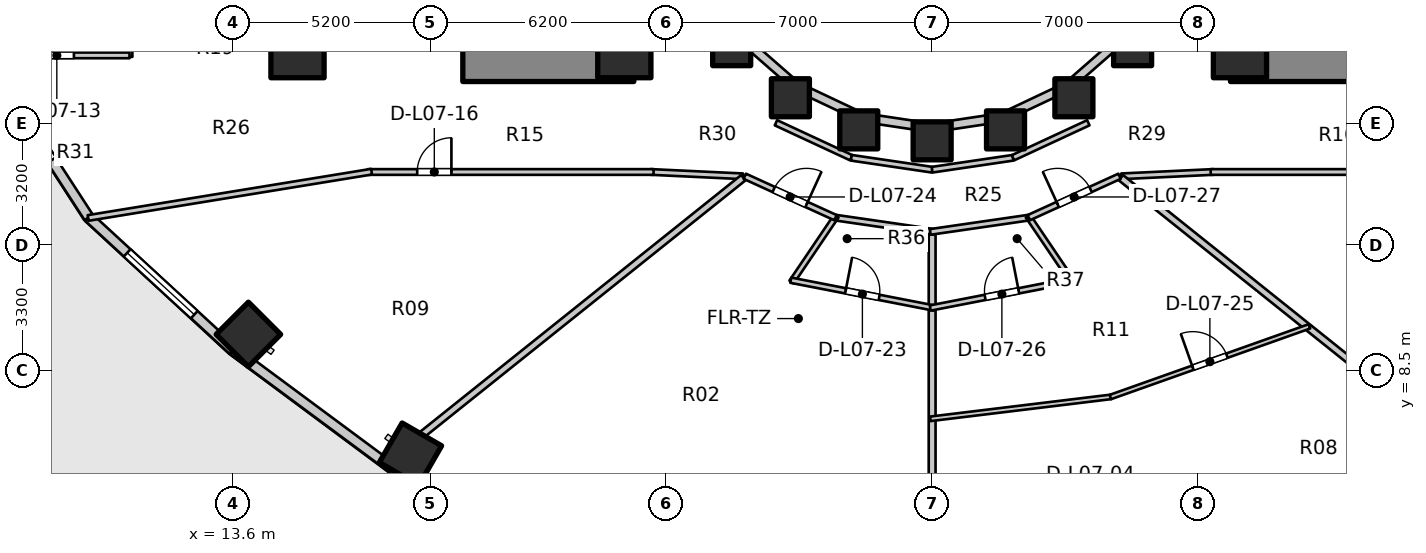
"""IFC4 building model, lengths in metres.
Left out: names, types, materials, properties, quantities, classifications, styles, units other than length and angle.
Written with IfcOpenShell. Run it as: python <this file> out.ifc"""

import sys

from ifc_helpers import new_model, si_unit, direction, frame, frame_2d, origin, origin_2d, place, context, subcontext, project, spatial, rectangle, extrude, element, fill, save


model = new_model("IFC4")
c1 = context("Model", 3, precision=1e-05, world=origin(), true_north=direction((0.0, 1.0)))
c2 = subcontext(c1, "Body", "Model", "MODEL_VIEW")
j1 = project(units=[si_unit("LENGTHUNIT", "METRE"), si_unit("PLANEANGLEUNIT", "RADIAN")], contexts=[c1])
p1 = place(None, origin())
s1 = spatial("IfcSite", under=j1, at=p1, CompositionType="ELEMENT")
p2 = place(p1, origin())
s2 = spatial("IfcBuilding", under=s1, at=p2, CompositionType="ELEMENT")
p3 = place(p2, frame((0.0, 0.0, 27.6)))
s3 = spatial("IfcBuildingStorey", under=s2, at=p3, CompositionType="ELEMENT", Elevation=27.6)
for number, where, z_axis, x_axis in (
    (1, (19.65, 16.55, 0.0), (0.0, 0.0, 1.0), (1.0, 0.0, 0.0)),
    (2, (39.85, 16.55, 0.0), (0.0, 0.0, 1.0), (1.0, 0.0, 0.0)),
):
    element("IfcWall", number, at=place(p3, frame(where, z_axis=z_axis, x_axis=x_axis)), inside=s3, PredefinedType="SHEAR", context=c2, shape_type="SweptSolid", body=[
        extrude(rectangle(XDim=4.5, YDim=0.9, at=frame_2d((2.25, 0.0))), origin(), (0.0, 0.0, 1.0), 3.1),
    ])
for number, where, z_axis, x_axis in (
    (3, (15.3, 16.9, 0.0), (0.0, 0.0, 1.0), (1.0, 0.0, 0.0)),
    (4, (23.9, 16.9, 0.0), (0.0, 0.0, 1.0), (1.0, 0.0, 0.0)),
    (5, (40.1, 16.9, 0.0), (0.0, 0.0, 1.0), (1.0, 0.0, 0.0)),
):
    element("IfcColumn", number, at=place(p3, frame(where, z_axis=z_axis, x_axis=x_axis)), inside=s3, PredefinedType="COLUMN", context=c2, shape_type="SweptSolid", body=[
        extrude(rectangle(XDim=1.4, YDim=1.4, at=origin_2d()), origin(), (0.0, 0.0, 1.0), 3.1),
    ])
p4 = place(p3, frame((26.725, 17.018, 0.0), z_axis=(0.0, 0.0, 1.0), x_axis=(1.0, 0.0, 0.0)))
e6 = element("IfcColumn", 6, at=p4, inside=s3, PredefinedType="COLUMN", context=c2, shape_type="SweptSolid", body=[
    extrude(rectangle(XDim=1.0, YDim=1.0, at=origin_2d()), origin(), (0.0, 0.0, 1.0), 3.1),
])
p5 = place(p3, frame((14.008, 9.446, 0.0), z_axis=(0.0, 0.0, 1.0), x_axis=(-0.707106781187, -0.707106781187, 0.0)))
e7 = element("IfcColumn", 7, at=p5, inside=s3, PredefinedType="COLUMN", context=c2, shape_type="SweptSolid", body=[
    extrude(rectangle(XDim=1.2, YDim=1.2, at=origin_2d()), origin(), (0.0, 0.0, 1.0), 3.1),
])
p6 = place(p3, frame((28.27, 15.673, 0.0), z_axis=(0.0, 0.0, 1.0), x_axis=(1.0, 0.0, 0.0)))
e8 = element("IfcColumn", 8, at=p6, inside=s3, PredefinedType="COLUMN", context=c2, shape_type="SweptSolid", body=[
    extrude(rectangle(XDim=1.0, YDim=1.0, at=origin_2d()), origin(), (0.0, 0.0, 1.0), 3.1),
])
p7 = place(p3, frame((18.273, 6.296, 0.0), z_axis=(0.0, 0.0, 1.0), x_axis=(-0.5, -0.866025403784, 0.0)))
e9 = element("IfcColumn", 9, at=p7, inside=s3, PredefinedType="COLUMN", context=c2, shape_type="SweptSolid", body=[
    extrude(rectangle(XDim=1.2, YDim=1.2, at=origin_2d()), origin(), (0.0, 0.0, 1.0), 3.1),
])
for number, where, z_axis, x_axis in (
    (10, (30.069, 14.828, 0.0), (0.0, 0.0, 1.0), (1.0, 0.0, 0.0)),
    (11, (32.0, 14.54, 0.0), (0.0, 0.0, 1.0), (1.0, 0.0, 0.0)),
    (12, (33.931, 14.828, 0.0), (0.0, 0.0, 1.0), (1.0, 0.0, 0.0)),
    (13, (35.73, 15.673, 0.0), (0.0, 0.0, 1.0), (1.0, 0.0, 0.0)),
    (14, (37.275, 17.018, 0.0), (0.0, 0.0, 1.0), (1.0, 0.0, 0.0)),
):
    element("IfcColumn", number, at=place(p3, frame(where, z_axis=z_axis, x_axis=x_axis)), inside=s3, PredefinedType="COLUMN", context=c2, shape_type="SweptSolid", body=[
        extrude(rectangle(XDim=1.0, YDim=1.0, at=origin_2d()), origin(), (0.0, 0.0, 1.0), 3.1),
    ])
p8 = place(p3, frame((26.965, 17.258, 0.0), z_axis=(0.0, 0.0, 1.0), x_axis=(0.752576694707, -0.658504607869, 0.0)))
e15 = element("IfcWall", 15, at=p8, inside=s3, PredefinedType="STANDARD", context=c2, shape_type="SweptSolid", body=[
    extrude(rectangle(XDim=1.959, YDim=0.23, at=frame_2d((0.98, 0.0))), origin(), (0.0, 0.0, 1.0), 2.16),
])
p9 = place(p3, frame((28.44, 15.968, 0.0), z_axis=(0.0, 0.0, 1.0), x_axis=(0.904179699603, -0.427152280606, 0.0)))
e16 = element("IfcWall", 16, at=p9, inside=s3, PredefinedType="STANDARD", context=c2, shape_type="SweptSolid", body=[
    extrude(rectangle(XDim=1.899, YDim=0.23, at=frame_2d((0.95, 0.0))), origin(), (0.0, 0.0, 1.0), 2.16),
])
for number, where, z_axis, x_axis in (
    (17, (30.157, 15.157, 0.0), (0.0, 0.0, 1.0), (0.989, -0.149, 0.0)),
    (18, (32.0, 14.88, 0.0), (0.0, 0.0, 1.0), (0.989, 0.149, 0.0)),
):
    element("IfcWall", number, at=place(p3, frame(where, z_axis=z_axis, x_axis=x_axis)), inside=s3, PredefinedType="STANDARD", context=c2, shape_type="SweptSolid", body=[
        extrude(rectangle(XDim=1.864, YDim=0.23, at=frame_2d((0.932, 0.0))), origin(), (0.0, 0.0, 1.0), 2.16),
    ])
p10 = place(p3, frame((33.843, 15.157, 0.0), z_axis=(0.0, 0.0, 1.0), x_axis=(0.904179699603, 0.427152280606, 0.0)))
e19 = element("IfcWall", 19, at=p10, inside=s3, PredefinedType="STANDARD", context=c2, shape_type="SweptSolid", body=[
    extrude(rectangle(XDim=1.899, YDim=0.23, at=frame_2d((0.95, 0.0))), origin(), (0.0, 0.0, 1.0), 2.16),
])
p11 = place(p3, frame((35.56, 15.968, 0.0), z_axis=(0.0, 0.0, 1.0), x_axis=(0.752576694707, 0.658504607869, 0.0)))
e20 = element("IfcWall", 20, at=p11, inside=s3, PredefinedType="STANDARD", context=c2, shape_type="SweptSolid", body=[
    extrude(rectangle(XDim=1.959, YDim=0.23, at=frame_2d((0.98, 0.0))), origin(), (0.0, 0.0, 1.0), 2.16),
])
p12 = place(p3, frame((7.033, 16.795, 0.0), z_axis=(0.0, 0.0, 1.0), x_axis=(0.544578722263, -0.838709732421, 0.0)))
e21 = element("IfcWall", 21, at=p12, inside=s3, PredefinedType="STANDARD", context=c2, shape_type="SweptSolid", body=[
    extrude(rectangle(XDim=5.092, YDim=0.26, at=frame_2d((2.546, 0.0))), origin(), (0.0, 0.0, 1.0), 2.85),
])
p13 = place(p12, frame((1.796, 0.0, 0.75)))
e22 = element("IfcOpeningElement", 22, at=p13, cuts=e21, PredefinedType="OPENING", context=c2, shape_type="SweptSolid", body=[
    extrude(rectangle(XDim=1.5, YDim=1.6, at=frame_2d((0.75, 0.8))), frame((0.0, 0.14, 0.0), z_axis=(0.0, -1.0, 0.0), x_axis=(1.0, 0.0, 0.0)), (0.0, 0.0, 1.0), 0.28),
])
p14 = place(p3, frame((9.806, 12.524, 0.0), z_axis=(0.0, 0.0, 1.0), x_axis=(0.735655109293, -0.67735630223, 0.0)))
e23 = element("IfcWall", 23, at=p14, inside=s3, PredefinedType="STANDARD", context=c2, shape_type="SweptSolid", body=[
    extrude(rectangle(XDim=5.151, YDim=0.26, at=frame_2d((2.575, 0.0))), origin(), (0.0, 0.0, 1.0), 2.85),
])
p15 = place(p14, frame((1.375, 0.0, 0.75)))
e24 = element("IfcOpeningElement", 24, at=p15, cuts=e23, PredefinedType="OPENING", context=c2, shape_type="SweptSolid", body=[
    extrude(rectangle(XDim=2.4, YDim=1.7, at=frame_2d((1.2, 0.85))), frame((0.0, 0.14, 0.0), z_axis=(0.0, -1.0, 0.0), x_axis=(1.0, 0.0, 0.0)), (0.0, 0.0, 1.0), 0.28),
])
p16 = place(p3, frame((13.595, 9.035, 0.0), z_axis=(0.0, 0.0, 1.0), x_axis=(0.803477531792, -0.595335078679, 0.0)))
e25 = element("IfcWall", 25, at=p16, inside=s3, PredefinedType="STANDARD", context=c2, shape_type="SweptSolid", body=[
    extrude(rectangle(XDim=5.43, YDim=0.26, at=frame_2d((2.715, 0.0))), origin(), (0.0, 0.0, 1.0), 2.85),
])
p17 = place(p3, frame((17.958, 5.803, 0.0), z_axis=(0.0, 0.0, 1.0), x_axis=(0.919612132394, -0.39282760335, 0.0)))
e26 = element("IfcWall", 26, at=p17, inside=s3, PredefinedType="STANDARD", context=c2, shape_type="SweptSolid", body=[
    extrude(rectangle(XDim=6.209, YDim=0.26, at=frame_2d((3.105, 0.0))), origin(), (0.0, 0.0, 1.0), 2.85),
])
p18 = place(p17, frame((2.355, 0.0, 0.75)))
e27 = element("IfcOpeningElement", 27, at=p18, cuts=e26, PredefinedType="OPENING", context=c2, shape_type="SweptSolid", body=[
    extrude(rectangle(XDim=1.5, YDim=1.6, at=frame_2d((0.75, 0.8))), frame((0.0, 0.14, 0.0), z_axis=(0.0, -1.0, 0.0), x_axis=(1.0, 0.0, 0.0)), (0.0, 0.0, 1.0), 0.28),
])
p19 = place(p3, frame((40.332, 3.364, 0.0), z_axis=(0.0, 0.0, 1.0), x_axis=(0.919612132394, 0.39282760335, 0.0)))
e28 = element("IfcWall", 28, at=p19, inside=s3, PredefinedType="STANDARD", context=c2, shape_type="SweptSolid", body=[
    extrude(rectangle(XDim=6.209, YDim=0.26, at=frame_2d((3.105, 0.0))), origin(), (0.0, 0.0, 1.0), 2.85),
])
p20 = place(p19, frame((2.355, 0.0, 0.75)))
e29 = element("IfcOpeningElement", 29, at=p20, cuts=e28, PredefinedType="OPENING", context=c2, shape_type="SweptSolid", body=[
    extrude(rectangle(XDim=1.5, YDim=1.6, at=frame_2d((0.75, 0.8))), frame((0.0, 0.14, 0.0), z_axis=(0.0, -1.0, 0.0), x_axis=(1.0, 0.0, 0.0)), (0.0, 0.0, 1.0), 0.28),
])
p21 = place(p3, frame((27.89, 15.015, 0.0), z_axis=(0.0, 0.0, 1.0), x_axis=(0.906943449489, -0.421252393975, 0.0)))
e30 = element("IfcWall", 30, at=p21, inside=s3, PredefinedType="PARTITIONING", context=c2, shape_type="SweptSolid", body=[
    extrude(rectangle(XDim=2.186, YDim=0.15, at=frame_2d((1.093, 0.0))), origin(), (0.0, 0.0, 1.0), 2.237),
])
for number, where, z_axis, x_axis in (
    (31, (29.873, 14.094, 0.0), (0.0, 0.0, 1.0), (0.989, -0.146, 0.0)),
    (32, (32.0, 13.78, 0.0), (0.0, 0.0, 1.0), (0.989, 0.146, 0.0)),
):
    element("IfcWall", number, at=place(p3, frame(where, z_axis=z_axis, x_axis=x_axis)), inside=s3, PredefinedType="PARTITIONING", context=c2, shape_type="SweptSolid", body=[
        extrude(rectangle(XDim=2.151, YDim=0.15, at=frame_2d((1.075, 0.0))), origin(), (0.0, 0.0, 1.0), 2.237),
    ])
p22 = place(p3, frame((34.127, 14.094, 0.0), z_axis=(0.0, 0.0, 1.0), x_axis=(0.906943449489, 0.421252393975, 0.0)))
e33 = element("IfcWall", 33, at=p22, inside=s3, PredefinedType="PARTITIONING", context=c2, shape_type="SweptSolid", body=[
    extrude(rectangle(XDim=2.186, YDim=0.15, at=frame_2d((1.093, 0.0))), origin(), (0.0, 0.0, 1.0), 2.237),
])
p23 = place(p3, frame((10.88, 16.748, 0.0), z_axis=(0.0, 0.0, 1.0), x_axis=(0.0, 1.0, 0.0)))
e34 = element("IfcWall", 34, at=p23, inside=s3, PredefinedType="PARTITIONING", context=c2, shape_type="SweptSolid", body=[
    extrude(rectangle(XDim=12.503, YDim=0.15, at=frame_2d((6.252, 0.0))), origin(), (0.0, 0.0, 1.0), 2.12),
])
p24 = place(p3, frame((7.014, 16.788, 0.0), z_axis=(0.0, 0.0, 1.0), x_axis=(1.0, 0.0, 0.0)))
e35 = element("IfcWall", 35, at=p24, inside=s3, PredefinedType="PARTITIONING", context=c2, shape_type="SweptSolid", body=[
    extrude(rectangle(XDim=3.866, YDim=0.15, at=frame_2d((1.933, 0.0))), origin(), (0.0, 0.0, 1.0), 2.855),
])
p25 = place(p24, frame((1.503, 0.0, 0.0)))
e36 = element("IfcOpeningElement", 36, at=p25, cuts=e35, PredefinedType="OPENING", context=c2, shape_type="SweptSolid", body=[
    extrude(rectangle(XDim=0.9, YDim=2.1, at=frame_2d((0.45, 1.05))), frame((0.0, 0.085, 0.0), z_axis=(0.0, -1.0, 0.0), x_axis=(1.0, 0.0, 0.0)), (0.0, 0.0, 1.0), 0.17),
])
p26 = place(p3, frame((27.02, 13.606, 0.0), z_axis=(0.0, 0.0, 1.0), x_axis=(-0.998877427952, 0.047369651964, 0.0)))
e37 = element("IfcWall", 37, at=p26, inside=s3, PredefinedType="PARTITIONING", context=c2, shape_type="SweptSolid", body=[
    extrude(rectangle(XDim=2.433, YDim=0.15, at=frame_2d((1.216, 0.0))), origin(), (0.0, 0.0, 1.0), 2.237),
])
p27 = place(p3, frame((17.15, 13.72, 0.0), z_axis=(0.0, 0.0, 1.0), x_axis=(1.0, 0.0, 0.0)))
e38 = element("IfcWall", 38, at=p27, inside=s3, PredefinedType="PARTITIONING", context=c2, shape_type="SweptSolid", body=[
    extrude(rectangle(XDim=7.52, YDim=0.15, at=frame_2d((3.76, 0.0))), origin(), (0.0, 0.0, 1.0), 2.237),
])
p28 = place(p27, frame((1.3, 0.0, 0.0)))
e39 = element("IfcOpeningElement", 39, at=p28, cuts=e38, PredefinedType="OPENING", context=c2, shape_type="SweptSolid", body=[
    extrude(rectangle(XDim=0.9, YDim=2.1, at=frame_2d((0.45, 1.05))), frame((0.0, 0.085, 0.0), z_axis=(0.0, -1.0, 0.0), x_axis=(1.0, 0.0, 0.0)), (0.0, 0.0, 1.0), 0.17),
])
p29 = place(p3, frame((17.249, 13.728, 0.0), z_axis=(0.0, 0.0, 1.0), x_axis=(-0.98693078372, -0.161144742846, 0.0)))
e40 = element("IfcWall", 40, at=p29, inside=s3, PredefinedType="PARTITIONING", context=c2, shape_type="SweptSolid", body=[
    extrude(rectangle(XDim=7.557, YDim=0.15, at=frame_2d((3.779, 0.0))), origin(), (0.0, 0.0, 1.0), 2.069),
])
p30 = place(p3, frame((36.98, 13.606, 0.0), z_axis=(0.0, 0.0, 1.0), x_axis=(0.998877427952, 0.047369651964, 0.0)))
e41 = element("IfcWall", 41, at=p30, inside=s3, PredefinedType="PARTITIONING", context=c2, shape_type="SweptSolid", body=[
    extrude(rectangle(XDim=2.433, YDim=0.15, at=frame_2d((1.216, 0.0))), origin(), (0.0, 0.0, 1.0), 2.237),
])
p31 = place(p3, frame((39.33, 13.72, 0.0), z_axis=(0.0, 0.0, 1.0), x_axis=(1.0, 0.0, 0.0)))
e42 = element("IfcWall", 42, at=p31, inside=s3, PredefinedType="PARTITIONING", context=c2, shape_type="SweptSolid", body=[
    extrude(rectangle(XDim=7.52, YDim=0.15, at=frame_2d((3.76, 0.0))), origin(), (0.0, 0.0, 1.0), 2.237),
])
p32 = place(p31, frame((5.22, 0.0, 0.0)))
e43 = element("IfcOpeningElement", 43, at=p32, cuts=e42, PredefinedType="OPENING", context=c2, shape_type="SweptSolid", body=[
    extrude(rectangle(XDim=0.9, YDim=2.1, at=frame_2d((0.45, 1.05))), frame((0.0, 0.085, 0.0), z_axis=(0.0, -1.0, 0.0), x_axis=(1.0, 0.0, 0.0)), (0.0, 0.0, 1.0), 0.17),
])
p33 = place(p3, frame((27.032, 13.569, 0.0), z_axis=(0.0, 0.0, 1.0), x_axis=(-0.781055486744, -0.624461629428, 0.0)))
e44 = element("IfcWall", 44, at=p33, inside=s3, PredefinedType="PARTITIONING", context=c2, shape_type="SweptSolid", body=[
    extrude(rectangle(XDim=10.843, YDim=0.18, at=frame_2d((5.422, 0.0))), origin(), (0.0, 0.0, 1.0), 2.237),
])
p34 = place(p3, frame((32.0, 12.095, 0.0), z_axis=(0.0, 0.0, 1.0), x_axis=(0.0, -1.0, 0.0)))
e45 = element("IfcWall", 45, at=p34, inside=s3, PredefinedType="PARTITIONING", context=c2, shape_type="SweptSolid", body=[
    extrude(rectangle(XDim=8.395, YDim=0.18, at=frame_2d((4.198, 0.0))), origin(), (0.0, 0.0, 1.0), 2.237),
])
p35 = place(p3, frame((36.968, 13.569, 0.0), z_axis=(0.0, 0.0, 1.0), x_axis=(0.781055486744, -0.624461629428, 0.0)))
e46 = element("IfcWall", 46, at=p35, inside=s3, PredefinedType="PARTITIONING", context=c2, shape_type="SweptSolid", body=[
    extrude(rectangle(XDim=10.843, YDim=0.18, at=frame_2d((5.422, 0.0))), origin(), (0.0, 0.0, 1.0), 2.237),
])
p36 = place(p3, frame((29.401, 12.527, 0.0), z_axis=(0.0, 0.0, 1.0), x_axis=(0.989649898776, -0.143502884474, 0.0)))
e47 = element("IfcWall", 47, at=p36, inside=s3, PredefinedType="PARTITIONING", context=c2, shape_type="SweptSolid", body=[
    extrude(rectangle(XDim=2.676, YDim=0.15, at=frame_2d((1.338, 0.0))), origin(), (0.0, 0.0, 1.0), 2.237),
])
p37 = place(p3, frame((29.479, 12.561, 0.0), z_axis=(0.0, 0.0, 1.0), x_axis=(-0.56056273171, -0.828111963335, 0.0)))
e48 = element("IfcWall", 48, at=p37, inside=s3, PredefinedType="PLUMBINGWALL", context=c2, shape_type="SweptSolid", body=[
    extrude(rectangle(XDim=2.1, YDim=0.14, at=frame_2d((1.05, 0.0))), origin(), (0.0, 0.0, 1.0), 2.855),
])
p38 = place(p3, frame((28.28, 10.873, 0.0), z_axis=(0.0, 0.0, 1.0), x_axis=(0.981623000654, -0.190830512727, 0.0)))
e49 = element("IfcWall", 49, at=p38, inside=s3, PredefinedType="PLUMBINGWALL", context=c2, shape_type="SweptSolid", body=[
    extrude(rectangle(XDim=3.839, YDim=0.14, at=frame_2d((1.92, 0.0))), origin(), (0.0, 0.0, 1.0), 2.237),
])
p39 = place(p38, frame((1.47, 0.0, 0.0)))
e50 = element("IfcOpeningElement", 50, at=p39, cuts=e49, PredefinedType="OPENING", context=c2, shape_type="SweptSolid", body=[
    extrude(rectangle(XDim=0.9, YDim=2.1, at=frame_2d((0.45, 1.05))), frame((0.0, 0.08, 0.0), z_axis=(0.0, -1.0, 0.0), x_axis=(1.0, 0.0, 0.0)), (0.0, 0.0, 1.0), 0.16),
])
p40 = place(p3, frame((27.069, 13.607, 0.0), z_axis=(0.0, 0.0, 1.0), x_axis=(0.909747571199, -0.415161843982, 0.0)))
e51 = element("IfcWall", 51, at=p40, inside=s3, PredefinedType="PARTITIONING", context=c2, shape_type="SweptSolid", body=[
    extrude(rectangle(XDim=2.625, YDim=0.15, at=frame_2d((1.312, 0.0))), origin(), (0.0, 0.0, 1.0), 2.237),
])
p41 = place(p40, frame((0.838, 0.0, 0.0)))
e52 = element("IfcOpeningElement", 52, at=p41, cuts=e51, PredefinedType="OPENING", context=c2, shape_type="SweptSolid", body=[
    extrude(rectangle(XDim=0.95, YDim=2.1, at=frame_2d((0.475, 1.05))), frame((0.0, 0.085, 0.0), z_axis=(0.0, -1.0, 0.0), x_axis=(1.0, 0.0, 0.0)), (0.0, 0.0, 1.0), 0.17),
])
p42 = place(p3, frame((31.95, 7.225, 0.0), z_axis=(0.0, 0.0, 1.0), x_axis=(0.992699076447, 0.120617343785, 0.0)))
e53 = element("IfcWall", 53, at=p42, inside=s3, PredefinedType="MOVABLE", context=c2, shape_type="SweptSolid", body=[
    extrude(rectangle(XDim=4.793, YDim=0.12, at=frame_2d((2.396, 0.0))), origin(), (0.0, 0.0, 1.0), 2.237),
])
p43 = place(p3, frame((36.689, 7.798, 0.0), z_axis=(0.0, 0.0, 1.0), x_axis=(0.942369240096, 0.334574678243, 0.0)))
e54 = element("IfcWall", 54, at=p43, inside=s3, PredefinedType="MOVABLE", context=c2, shape_type="SweptSolid", body=[
    extrude(rectangle(XDim=5.559, YDim=0.12, at=frame_2d((2.779, 0.0))), origin(), (0.0, 0.0, 1.0), 2.237),
])
p44 = place(p43, frame((2.304, 0.0, 0.0)))
e55 = element("IfcOpeningElement", 55, at=p44, cuts=e54, PredefinedType="OPENING", context=c2, shape_type="SweptSolid", body=[
    extrude(rectangle(XDim=0.95, YDim=2.1, at=frame_2d((0.475, 1.05))), frame((0.0, 0.07, 0.0), z_axis=(0.0, -1.0, 0.0), x_axis=(1.0, 0.0, 0.0)), (0.0, 0.0, 1.0), 0.14),
])
p45 = place(p3, frame((31.95, 12.143, 0.0), z_axis=(0.0, 0.0, 1.0), x_axis=(0.989649898776, 0.143502884474, 0.0)))
e56 = element("IfcWall", 56, at=p45, inside=s3, PredefinedType="PARTITIONING", context=c2, shape_type="SweptSolid", body=[
    extrude(rectangle(XDim=2.676, YDim=0.15, at=frame_2d((1.338, 0.0))), origin(), (0.0, 0.0, 1.0), 2.237),
])
p46 = place(p3, frame((34.521, 12.561, 0.0), z_axis=(0.0, 0.0, 1.0), x_axis=(0.56056273171, -0.828111963335, 0.0)))
e57 = element("IfcWall", 57, at=p46, inside=s3, PredefinedType="PLUMBINGWALL", context=c2, shape_type="SweptSolid", body=[
    extrude(rectangle(XDim=2.1, YDim=0.14, at=frame_2d((1.05, 0.0))), origin(), (0.0, 0.0, 1.0), 2.855),
])
p47 = place(p3, frame((31.951, 10.14, 0.0), z_axis=(0.0, 0.0, 1.0), x_axis=(0.981623000654, 0.190830512727, 0.0)))
e58 = element("IfcWall", 58, at=p47, inside=s3, PredefinedType="PLUMBINGWALL", context=c2, shape_type="SweptSolid", body=[
    extrude(rectangle(XDim=3.839, YDim=0.14, at=frame_2d((1.92, 0.0))), origin(), (0.0, 0.0, 1.0), 2.237),
])
p48 = place(p47, frame((1.47, 0.0, 0.0)))
e59 = element("IfcOpeningElement", 59, at=p48, cuts=e58, PredefinedType="OPENING", context=c2, shape_type="SweptSolid", body=[
    extrude(rectangle(XDim=0.9, YDim=2.1, at=frame_2d((0.45, 1.05))), frame((0.0, 0.08, 0.0), z_axis=(0.0, -1.0, 0.0), x_axis=(1.0, 0.0, 0.0)), (0.0, 0.0, 1.0), 0.16),
])
p49 = place(p3, frame((34.543, 12.518, 0.0), z_axis=(0.0, 0.0, 1.0), x_axis=(0.909747571199, 0.415161843982, 0.0)))
e60 = element("IfcWall", 60, at=p49, inside=s3, PredefinedType="PARTITIONING", context=c2, shape_type="SweptSolid", body=[
    extrude(rectangle(XDim=2.625, YDim=0.15, at=frame_2d((1.312, 0.0))), origin(), (0.0, 0.0, 1.0), 2.237),
])
p50 = place(p49, frame((0.838, 0.0, 0.0)))
e61 = element("IfcOpeningElement", 61, at=p50, cuts=e60, PredefinedType="OPENING", context=c2, shape_type="SweptSolid", body=[
    extrude(rectangle(XDim=0.95, YDim=2.1, at=frame_2d((0.475, 1.05))), frame((0.0, 0.085, 0.0), z_axis=(0.0, -1.0, 0.0), x_axis=(1.0, 0.0, 0.0)), (0.0, 0.0, 1.0), 0.17),
])
p51 = place(p13, origin())
e62 = element("IfcWindow", 62, at=p51, inside=s3, PartitioningType="SINGLE_PANEL", PredefinedType="WINDOW", context=c2, shape_type="SweptSolid", body=[
    extrude(rectangle(XDim=1.5, YDim=1.6, at=frame_2d((0.75, 0.8))), frame((0.0, 0.03, 0.0), z_axis=(0.0, -1.0, 0.0), x_axis=(1.0, 0.0, 0.0)), (0.0, 0.0, 1.0), 0.06),
])
fill(e22, e62)
p52 = place(p15, origin())
e63 = element("IfcWindow", 63, at=p52, inside=s3, PartitioningType="SINGLE_PANEL", PredefinedType="WINDOW", context=c2, shape_type="SweptSolid", body=[
    extrude(rectangle(XDim=2.4, YDim=1.7, at=frame_2d((1.2, 0.85))), frame((0.0, 0.03, 0.0), z_axis=(0.0, -1.0, 0.0), x_axis=(1.0, 0.0, 0.0)), (0.0, 0.0, 1.0), 0.06),
])
fill(e24, e63)
p53 = place(p25, origin())
e64 = element("IfcDoor", 64, at=p53, inside=s3, OperationType="SINGLE_SWING_LEFT", PredefinedType="DOOR", context=c2, shape_type="SweptSolid", body=[
    extrude(rectangle(XDim=0.9, YDim=2.1, at=frame_2d((0.45, 1.05))), frame((0.0, 0.025, 0.0), z_axis=(0.0, -1.0, 0.0), x_axis=(1.0, 0.0, 0.0)), (0.0, 0.0, 1.0), 0.05),
])
fill(e36, e64)
p54 = place(p28, origin())
e65 = element("IfcDoor", 65, at=p54, inside=s3, OperationType="SINGLE_SWING_RIGHT", PredefinedType="DOOR", context=c2, shape_type="SweptSolid", body=[
    extrude(rectangle(XDim=0.9, YDim=2.1, at=frame_2d((0.45, 1.05))), frame((0.0, 0.025, 0.0), z_axis=(0.0, -1.0, 0.0), x_axis=(1.0, 0.0, 0.0)), (0.0, 0.0, 1.0), 0.05),
])
fill(e39, e65)
p55 = place(p39, origin())
e66 = element("IfcDoor", 66, at=p55, inside=s3, OperationType="SINGLE_SWING_LEFT", PredefinedType="DOOR", context=c2, shape_type="SweptSolid", body=[
    extrude(rectangle(XDim=0.9, YDim=2.1, at=frame_2d((0.45, 1.05))), frame((0.0, 0.025, 0.0), z_axis=(0.0, -1.0, 0.0), x_axis=(1.0, 0.0, 0.0)), (0.0, 0.0, 1.0), 0.05),
])
fill(e50, e66)
p56 = place(p41, origin())
e67 = element("IfcDoor", 67, at=p56, inside=s3, OperationType="SINGLE_SWING_RIGHT", PredefinedType="DOOR", context=c2, shape_type="SweptSolid", body=[
    extrude(rectangle(XDim=0.95, YDim=2.1, at=frame_2d((0.475, 1.05))), frame((0.0, 0.025, 0.0), z_axis=(0.0, -1.0, 0.0), x_axis=(1.0, 0.0, 0.0)), (0.0, 0.0, 1.0), 0.05),
])
fill(e52, e67)
p57 = place(p44, origin())
e68 = element("IfcDoor", 68, at=p57, inside=s3, OperationType="SINGLE_SWING_LEFT", PredefinedType="DOOR", context=c2, shape_type="SweptSolid", body=[
    extrude(rectangle(XDim=0.95, YDim=2.1, at=frame_2d((0.475, 1.05))), frame((0.0, 0.025, 0.0), z_axis=(0.0, -1.0, 0.0), x_axis=(1.0, 0.0, 0.0)), (0.0, 0.0, 1.0), 0.05),
])
fill(e55, e68)
p58 = place(p48, origin())
e69 = element("IfcDoor", 69, at=p58, inside=s3, OperationType="SINGLE_SWING_RIGHT", PredefinedType="DOOR", context=c2, shape_type="SweptSolid", body=[
    extrude(rectangle(XDim=0.9, YDim=2.1, at=frame_2d((0.45, 1.05))), frame((0.0, 0.025, 0.0), z_axis=(0.0, -1.0, 0.0), x_axis=(1.0, 0.0, 0.0)), (0.0, 0.0, 1.0), 0.05),
])
fill(e59, e69)
p59 = place(p50, origin())
e70 = element("IfcDoor", 70, at=p59, inside=s3, OperationType="SINGLE_SWING_LEFT", PredefinedType="DOOR", context=c2, shape_type="SweptSolid", body=[
    extrude(rectangle(XDim=0.95, YDim=2.1, at=frame_2d((0.475, 1.05))), frame((0.0, 0.025, 0.0), z_axis=(0.0, -1.0, 0.0), x_axis=(1.0, 0.0, 0.0)), (0.0, 0.0, 1.0), 0.05),
])
fill(e61, e70)
save(model, sys.argv[1])
